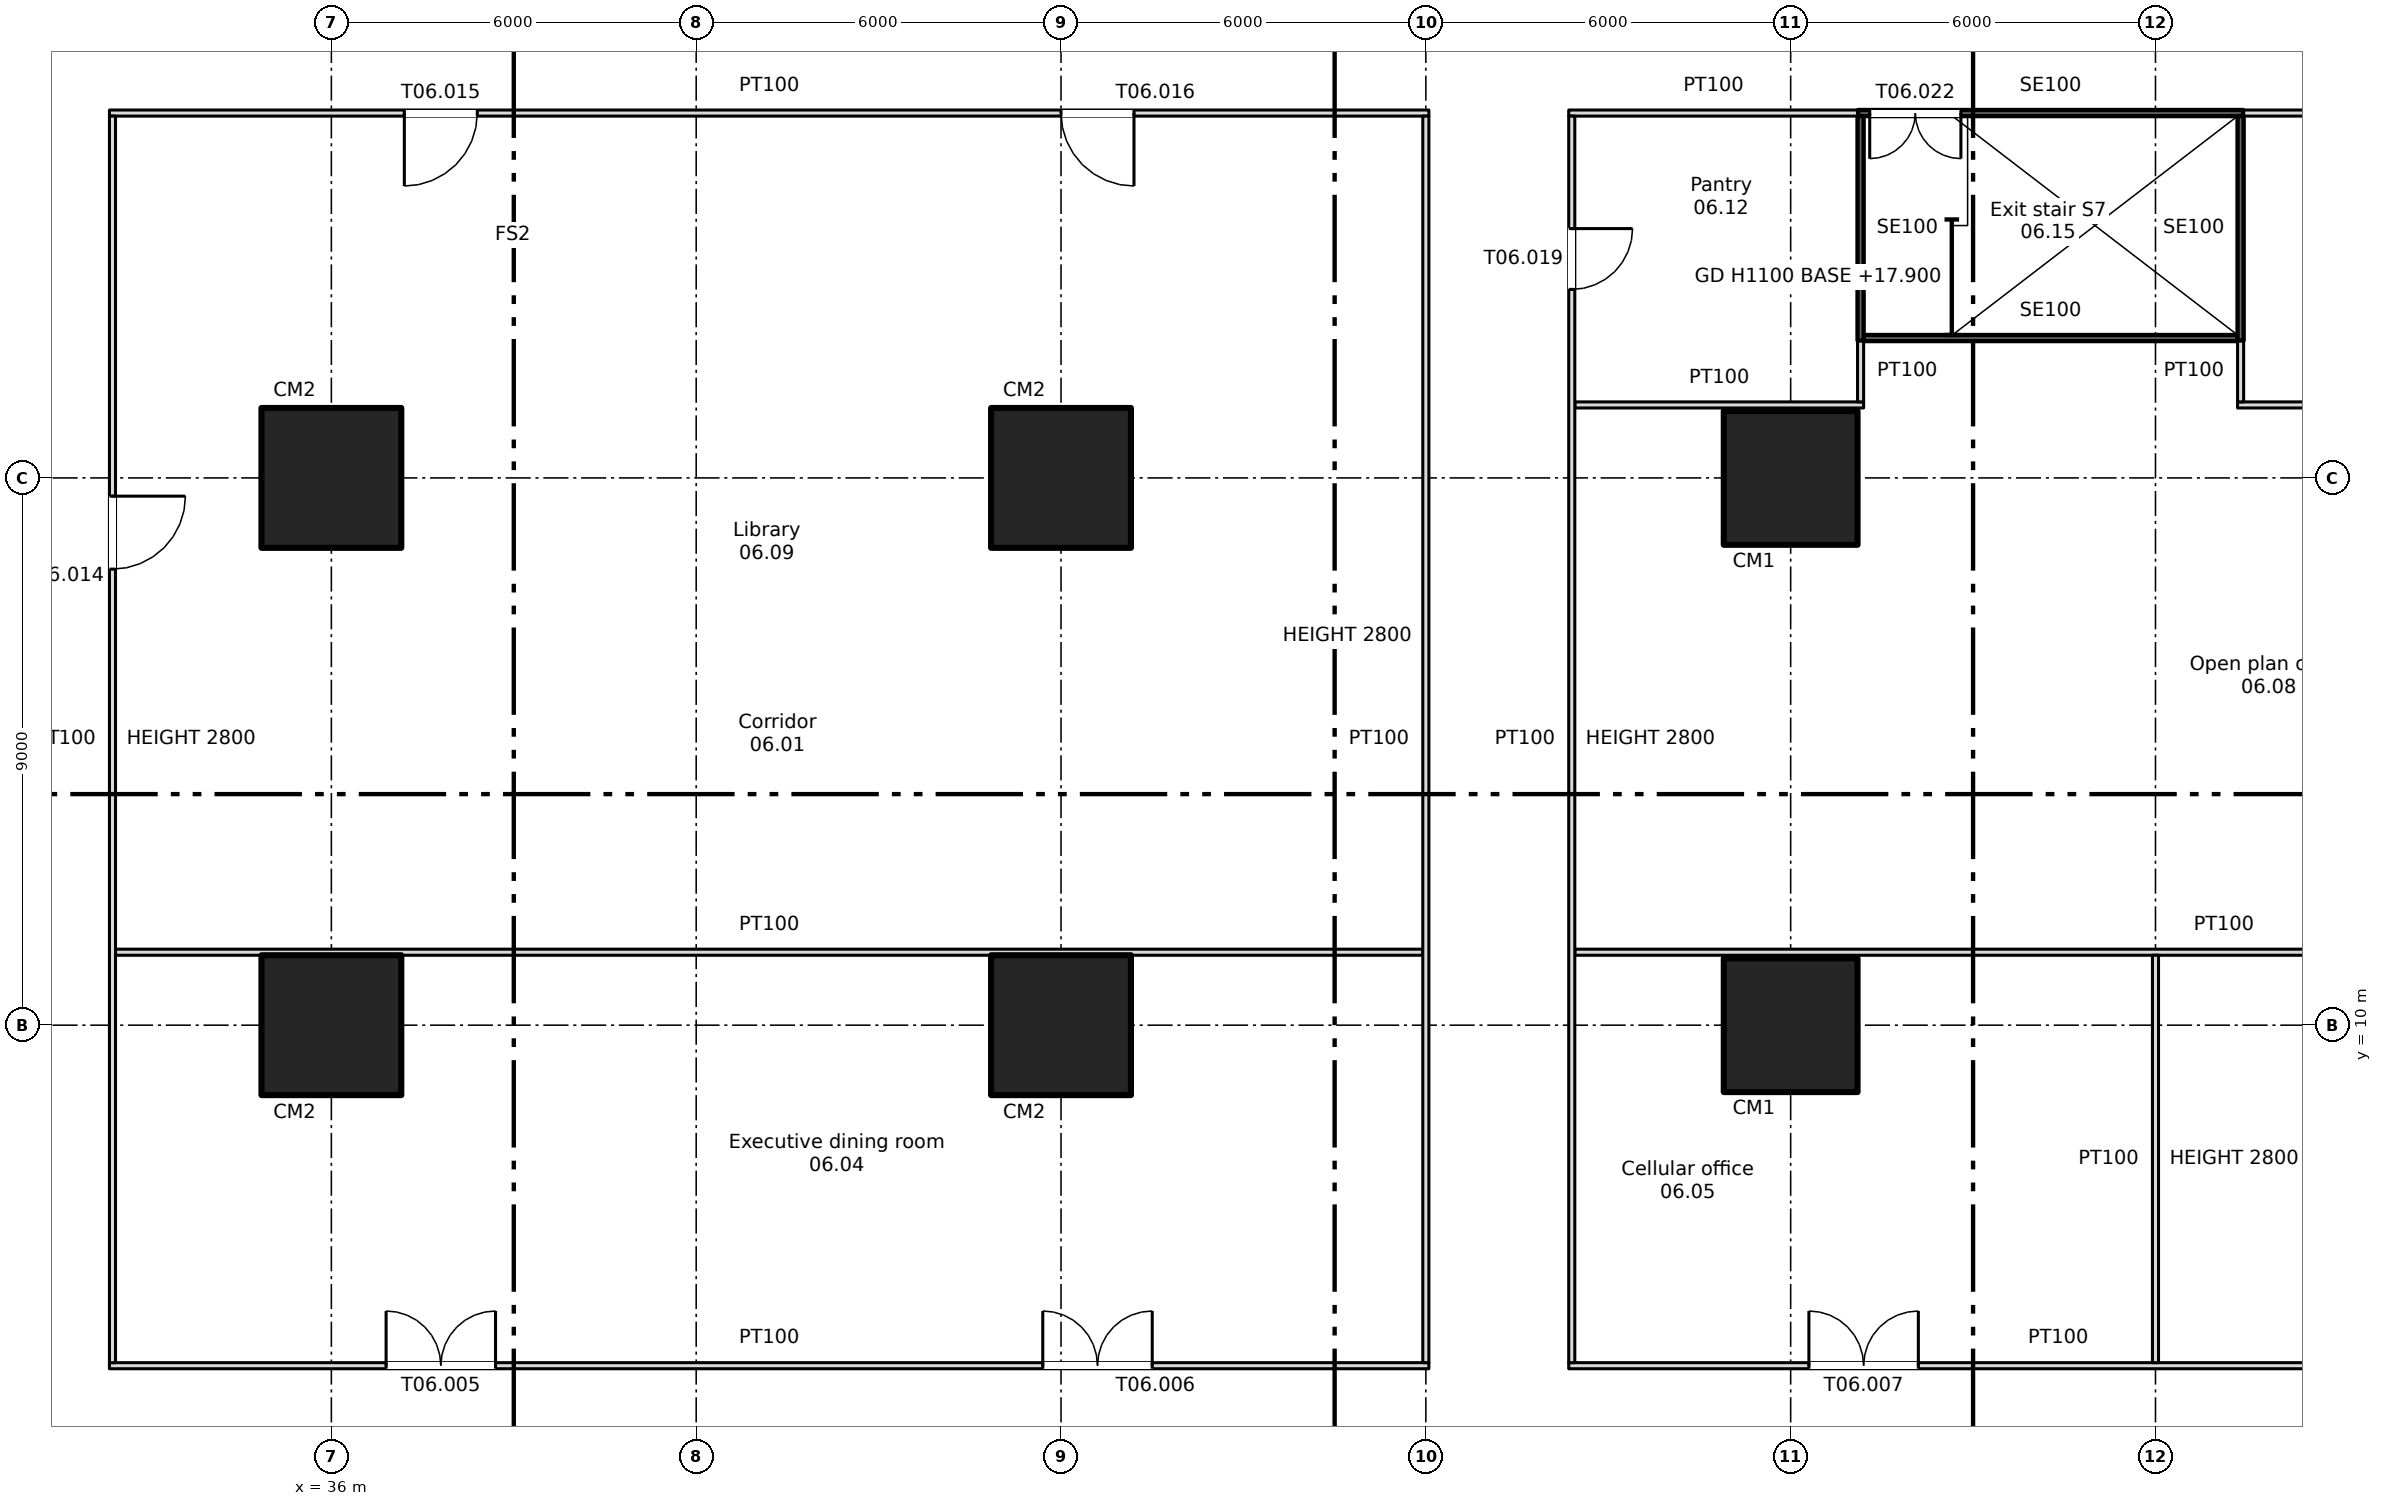
"""IFC4 building model, lengths in metres.
Left out: names, types, materials, properties, quantities, classifications, styles, units other than length and angle.
Written with IfcOpenShell. Run it as: python <this file> out.ifc"""

import sys

from ifc_helpers import new_model, si_unit, direction, frame, frame_2d, origin, origin_2d, place, context, subcontext, project, spatial, rectangle, extrude, element, fill, save


model = new_model("IFC4")
c1 = context("Model", 3, precision=1e-05, world=origin(), true_north=direction((0.0, 1.0)))
c2 = subcontext(c1, "Body", "Model", "MODEL_VIEW")
j1 = project(units=[si_unit("LENGTHUNIT", "METRE"), si_unit("PLANEANGLEUNIT", "RADIAN")], contexts=[c1])
p1 = place(None, origin())
s1 = spatial("IfcSite", under=j1, at=p1, CompositionType="ELEMENT")
p2 = place(p1, origin())
s2 = spatial("IfcBuilding", under=s1, at=p2, CompositionType="ELEMENT")
p3 = place(p2, frame((0.0, 0.0, 17.9)))
s3 = spatial("IfcBuildingStorey", under=s2, at=p3, CompositionType="ELEMENT", Elevation=17.9)
for number, where, z_axis, x_axis in (
    (1, (36.0, 10.0, 0.0), (0.0, 0.0, 1.0), (1.0, 0.0, 0.0)),
    (2, (36.0, 19.0, 0.0), (0.0, 0.0, 1.0), (1.0, 0.0, 0.0)),
    (3, (48.0, 10.0, 0.0), (0.0, 0.0, 1.0), (1.0, 0.0, 0.0)),
    (4, (48.0, 19.0, 0.0), (0.0, 0.0, 1.0), (1.0, 0.0, 0.0)),
):
    element("IfcColumn", number, at=place(p3, frame(where, z_axis=z_axis, x_axis=x_axis)), inside=s3, PredefinedType="COLUMN", context=c2, shape_type="SweptSolid", body=[
        extrude(rectangle(XDim=2.3, YDim=2.3, at=origin_2d()), origin(), (0.0, 0.0, 1.0), 3.8),
    ])
for number, where, z_axis, x_axis in (
    (5, (60.0, 10.0, 0.0), (0.0, 0.0, 1.0), (1.0, 0.0, 0.0)),
    (6, (60.0, 19.0, 0.0), (0.0, 0.0, 1.0), (1.0, 0.0, 0.0)),
):
    element("IfcColumn", number, at=place(p3, frame(where, z_axis=z_axis, x_axis=x_axis)), inside=s3, PredefinedType="COLUMN", context=c2, shape_type="SweptSolid", body=[
        extrude(rectangle(XDim=2.2, YDim=2.2, at=origin_2d()), origin(), (0.0, 0.0, 1.0), 3.8),
    ])
p4 = place(p3, frame((32.35, 4.4, 0.0), z_axis=(0.0, 0.0, 1.0), x_axis=(1.0, 0.0, 0.0)))
e7 = element("IfcWall", 7, at=p4, inside=s3, PredefinedType="PARTITIONING", context=c2, shape_type="SweptSolid", body=[
    extrude(rectangle(XDim=21.7, YDim=0.1, at=frame_2d((10.85, 0.0))), origin(), (0.0, 0.0, 1.0), 3.8),
])
p5 = place(p4, frame((4.55, 0.0, 0.0)))
e8 = element("IfcOpeningElement", 8, at=p5, cuts=e7, PredefinedType="OPENING", context=c2, shape_type="SweptSolid", body=[
    extrude(rectangle(XDim=1.8, YDim=2.1, at=frame_2d((0.9, 1.05))), frame((0.0, 0.06, 0.0), z_axis=(0.0, -1.0, 0.0), x_axis=(1.0, 0.0, 0.0)), (0.0, 0.0, 1.0), 0.12),
])
p6 = place(p4, frame((15.35, 0.0, 0.0)))
e9 = element("IfcOpeningElement", 9, at=p6, cuts=e7, PredefinedType="OPENING", context=c2, shape_type="SweptSolid", body=[
    extrude(rectangle(XDim=1.8, YDim=2.1, at=frame_2d((0.9, 1.05))), frame((0.0, 0.06, 0.0), z_axis=(0.0, -1.0, 0.0), x_axis=(1.0, 0.0, 0.0)), (0.0, 0.0, 1.0), 0.12),
])
p7 = place(p3, frame((56.35, 4.4, 0.0), z_axis=(0.0, 0.0, 1.0), x_axis=(1.0, 0.0, 0.0)))
e10 = element("IfcWall", 10, at=p7, inside=s3, PredefinedType="PARTITIONING", context=c2, shape_type="SweptSolid", body=[
    extrude(rectangle(XDim=16.1, YDim=0.1, at=frame_2d((8.05, 0.0))), origin(), (0.0, 0.0, 1.0), 3.8),
])
p8 = place(p7, frame((3.95, 0.0, 0.0)))
e11 = element("IfcOpeningElement", 11, at=p8, cuts=e10, PredefinedType="OPENING", context=c2, shape_type="SweptSolid", body=[
    extrude(rectangle(XDim=1.8, YDim=2.1, at=frame_2d((0.9, 1.05))), frame((0.0, 0.06, 0.0), z_axis=(0.0, -1.0, 0.0), x_axis=(1.0, 0.0, 0.0)), (0.0, 0.0, 1.0), 0.12),
])
p9 = place(p3, frame((32.45, 11.2, 0.0), z_axis=(0.0, 0.0, 1.0), x_axis=(1.0, 0.0, 0.0)))
e12 = element("IfcWall", 12, at=p9, inside=s3, PredefinedType="PARTITIONING", context=c2, shape_type="SweptSolid", body=[
    extrude(rectangle(XDim=21.5, YDim=0.1, at=frame_2d((10.75, 0.0))), origin(), (0.0, 0.0, 1.0), 3.8),
])
p10 = place(p3, frame((56.45, 11.2, 0.0), z_axis=(0.0, 0.0, 1.0), x_axis=(1.0, 0.0, 0.0)))
e13 = element("IfcWall", 13, at=p10, inside=s3, PredefinedType="PARTITIONING", context=c2, shape_type="SweptSolid", body=[
    extrude(rectangle(XDim=18.3, YDim=0.1, at=frame_2d((9.15, 0.0))), origin(), (0.0, 0.0, 1.0), 3.8),
])
p11 = place(p3, frame((56.45, 20.2, 0.0), z_axis=(0.0, 0.0, 1.0), x_axis=(1.0, 0.0, 0.0)))
e14 = element("IfcWall", 14, at=p11, inside=s3, PredefinedType="PARTITIONING", context=c2, shape_type="SweptSolid", body=[
    extrude(rectangle(XDim=4.75, YDim=0.1, at=frame_2d((2.375, 0.0))), origin(), (0.0, 0.0, 1.0), 3.8),
])
p12 = place(p3, frame((67.35, 20.2, 0.0), z_axis=(0.0, 0.0, 1.0), x_axis=(1.0, 0.0, 0.0)))
e15 = element("IfcWall", 15, at=p12, inside=s3, PredefinedType="PARTITIONING", context=c2, shape_type="SweptSolid", body=[
    extrude(rectangle(XDim=7.4, YDim=0.1, at=frame_2d((3.7, 0.0))), origin(), (0.0, 0.0, 1.0), 3.8),
])
p13 = place(p3, frame((61.2, 21.3, 0.0), z_axis=(0.0, 0.0, 1.0), x_axis=(1.0, 0.0, 0.0)))
e16 = element("IfcWall", 16, at=p13, inside=s3, PredefinedType="SOLIDWALL", context=c2, shape_type="SweptSolid", body=[
    extrude(rectangle(XDim=6.15, YDim=0.1, at=frame_2d((3.075, 0.0))), origin(), (0.0, 0.0, 1.0), 3.8),
])
p14 = place(p3, frame((32.35, 25.0, 0.0), z_axis=(0.0, 0.0, 1.0), x_axis=(1.0, 0.0, 0.0)))
e17 = element("IfcWall", 17, at=p14, inside=s3, PredefinedType="PARTITIONING", context=c2, shape_type="SweptSolid", body=[
    extrude(rectangle(XDim=21.7, YDim=0.1, at=frame_2d((10.85, 0.0))), origin(), (0.0, 0.0, 1.0), 3.8),
])
p15 = place(p14, frame((4.85, 0.0, 0.0)))
e18 = element("IfcOpeningElement", 18, at=p15, cuts=e17, PredefinedType="OPENING", context=c2, shape_type="SweptSolid", body=[
    extrude(rectangle(XDim=1.2, YDim=2.1, at=frame_2d((0.6, 1.05))), frame((0.0, 0.06, 0.0), z_axis=(0.0, -1.0, 0.0), x_axis=(1.0, 0.0, 0.0)), (0.0, 0.0, 1.0), 0.12),
])
p16 = place(p14, frame((15.65, 0.0, 0.0)))
e19 = element("IfcOpeningElement", 19, at=p16, cuts=e17, PredefinedType="OPENING", context=c2, shape_type="SweptSolid", body=[
    extrude(rectangle(XDim=1.2, YDim=2.1, at=frame_2d((0.6, 1.05))), frame((0.0, 0.06, 0.0), z_axis=(0.0, -1.0, 0.0), x_axis=(1.0, 0.0, 0.0)), (0.0, 0.0, 1.0), 0.12),
])
p17 = place(p3, frame((56.35, 25.0, 0.0), z_axis=(0.0, 0.0, 1.0), x_axis=(1.0, 0.0, 0.0)))
e20 = element("IfcWall", 20, at=p17, inside=s3, PredefinedType="PARTITIONING", context=c2, shape_type="SweptSolid", body=[
    extrude(rectangle(XDim=4.76, YDim=0.1, at=frame_2d((2.38, 0.0))), origin(), (0.0, 0.0, 1.0), 3.8),
])
p18 = place(p3, frame((61.11, 25.0, 0.0), z_axis=(0.0, 0.0, 1.0), x_axis=(1.0, 0.0, 0.0)))
e21 = element("IfcWall", 21, at=p18, inside=s3, PredefinedType="SOLIDWALL", context=c2, shape_type="SweptSolid", body=[
    extrude(rectangle(XDim=6.33, YDim=0.1, at=frame_2d((3.165, 0.0))), origin(), (0.0, 0.0, 1.0), 3.8),
])
p19 = place(p18, frame((0.19, 0.0, 0.0)))
e22 = element("IfcOpeningElement", 22, at=p19, cuts=e21, PredefinedType="OPENING", context=c2, shape_type="SweptSolid", body=[
    extrude(rectangle(XDim=1.5, YDim=2.1, at=frame_2d((0.75, 1.05))), frame((0.0, 0.06, 0.0), z_axis=(0.0, -1.0, 0.0), x_axis=(1.0, 0.0, 0.0)), (0.0, 0.0, 1.0), 0.12),
])
p20 = place(p3, frame((67.44, 25.0, 0.0), z_axis=(0.0, 0.0, 1.0), x_axis=(1.0, 0.0, 0.0)))
e23 = element("IfcWall", 23, at=p20, inside=s3, PredefinedType="PARTITIONING", context=c2, shape_type="SweptSolid", body=[
    extrude(rectangle(XDim=7.41, YDim=0.1, at=frame_2d((3.705, 0.0))), origin(), (0.0, 0.0, 1.0), 3.8),
])
p21 = place(p20, frame((3.16, 0.0, 0.0)))
e24 = element("IfcOpeningElement", 24, at=p21, cuts=e23, PredefinedType="OPENING", context=c2, shape_type="SweptSolid", body=[
    extrude(rectangle(XDim=1.0, YDim=2.1, at=frame_2d((0.5, 1.05))), frame((0.0, 0.06, 0.0), z_axis=(0.0, -1.0, 0.0), x_axis=(1.0, 0.0, 0.0)), (0.0, 0.0, 1.0), 0.12),
])
p22 = place(p3, frame((32.4, 4.45, 0.0), z_axis=(0.0, 0.0, 1.0), x_axis=(0.0, 1.0, 0.0)))
e25 = element("IfcWall", 25, at=p22, inside=s3, PredefinedType="PARTITIONING", context=c2, shape_type="SweptSolid", body=[
    extrude(rectangle(XDim=20.5, YDim=0.1, at=frame_2d((10.25, 0.0))), origin(), (0.0, 0.0, 1.0), 2.8),
])
p23 = place(p22, frame((13.05, 0.0, 0.0)))
e26 = element("IfcOpeningElement", 26, at=p23, cuts=e25, PredefinedType="OPENING", context=c2, shape_type="SweptSolid", body=[
    extrude(rectangle(XDim=1.2, YDim=2.1, at=frame_2d((0.6, 1.05))), frame((0.0, 0.06, 0.0), z_axis=(0.0, -1.0, 0.0), x_axis=(1.0, 0.0, 0.0)), (0.0, 0.0, 1.0), 0.12),
])
p24 = place(p3, frame((54.0, 4.45, 0.0), z_axis=(0.0, 0.0, 1.0), x_axis=(0.0, 1.0, 0.0)))
e27 = element("IfcWall", 27, at=p24, inside=s3, PredefinedType="PARTITIONING", context=c2, shape_type="SweptSolid", body=[
    extrude(rectangle(XDim=20.5, YDim=0.1, at=frame_2d((10.25, 0.0))), origin(), (0.0, 0.0, 1.0), 2.8),
])
p25 = place(p3, frame((56.4, 4.45, 0.0), z_axis=(0.0, 0.0, 1.0), x_axis=(0.0, 1.0, 0.0)))
e28 = element("IfcWall", 28, at=p25, inside=s3, PredefinedType="PARTITIONING", context=c2, shape_type="SweptSolid", body=[
    extrude(rectangle(XDim=20.5, YDim=0.1, at=frame_2d((10.25, 0.0))), origin(), (0.0, 0.0, 1.0), 2.8),
])
p26 = place(p25, frame((17.65, 0.0, 0.0)))
e29 = element("IfcOpeningElement", 29, at=p26, cuts=e28, PredefinedType="OPENING", context=c2, shape_type="SweptSolid", body=[
    extrude(rectangle(XDim=1.0, YDim=2.1, at=frame_2d((0.5, 1.05))), frame((0.0, 0.06, 0.0), z_axis=(0.0, -1.0, 0.0), x_axis=(1.0, 0.0, 0.0)), (0.0, 0.0, 1.0), 0.12),
])
p27 = place(p3, frame((61.15, 20.25, 0.0), z_axis=(0.0, 0.0, 1.0), x_axis=(0.0, 1.0, 0.0)))
e30 = element("IfcWall", 30, at=p27, inside=s3, PredefinedType="PARTITIONING", context=c2, shape_type="SweptSolid", body=[
    extrude(rectangle(XDim=1.01, YDim=0.1, at=frame_2d((0.505, 0.0))), origin(), (0.0, 0.0, 1.0), 3.8),
])
p28 = place(p3, frame((61.15, 21.26, 0.0), z_axis=(0.0, 0.0, 1.0), x_axis=(0.0, 1.0, 0.0)))
e31 = element("IfcWall", 31, at=p28, inside=s3, PredefinedType="SOLIDWALL", context=c2, shape_type="SweptSolid", body=[
    extrude(rectangle(XDim=3.69, YDim=0.1, at=frame_2d((1.845, 0.0))), origin(), (0.0, 0.0, 1.0), 3.8),
])
p29 = place(p3, frame((66.0, 4.45, 0.0), z_axis=(0.0, 0.0, 1.0), x_axis=(0.0, 1.0, 0.0)))
e32 = element("IfcWall", 32, at=p29, inside=s3, PredefinedType="PARTITIONING", context=c2, shape_type="SweptSolid", body=[
    extrude(rectangle(XDim=6.7, YDim=0.1, at=frame_2d((3.35, 0.0))), origin(), (0.0, 0.0, 1.0), 2.8),
])
p30 = place(p3, frame((67.4, 20.25, 0.0), z_axis=(0.0, 0.0, 1.0), x_axis=(0.0, 1.0, 0.0)))
e33 = element("IfcWall", 33, at=p30, inside=s3, PredefinedType="PARTITIONING", context=c2, shape_type="SweptSolid", body=[
    extrude(rectangle(XDim=1.01, YDim=0.1, at=frame_2d((0.505, 0.0))), origin(), (0.0, 0.0, 1.0), 3.8),
])
p31 = place(p3, frame((67.4, 21.26, 0.0), z_axis=(0.0, 0.0, 1.0), x_axis=(0.0, 1.0, 0.0)))
e34 = element("IfcWall", 34, at=p31, inside=s3, PredefinedType="SOLIDWALL", context=c2, shape_type="SweptSolid", body=[
    extrude(rectangle(XDim=3.69, YDim=0.1, at=frame_2d((1.845, 0.0))), origin(), (0.0, 0.0, 1.0), 3.8),
])
p32 = place(p5, origin())
e35 = element("IfcDoor", 35, at=p32, inside=s3, OperationType="DOUBLE_DOOR_SINGLE_SWING", PredefinedType="DOOR", context=c2, shape_type="SweptSolid", body=[
    extrude(rectangle(XDim=1.8, YDim=2.1, at=frame_2d((0.9, 1.05))), frame((0.0, 0.025, 0.0), z_axis=(0.0, -1.0, 0.0), x_axis=(1.0, 0.0, 0.0)), (0.0, 0.0, 1.0), 0.05),
])
fill(e8, e35)
p33 = place(p6, origin())
e36 = element("IfcDoor", 36, at=p33, inside=s3, OperationType="DOUBLE_DOOR_SINGLE_SWING", PredefinedType="DOOR", context=c2, shape_type="SweptSolid", body=[
    extrude(rectangle(XDim=1.8, YDim=2.1, at=frame_2d((0.9, 1.05))), frame((0.0, 0.025, 0.0), z_axis=(0.0, -1.0, 0.0), x_axis=(1.0, 0.0, 0.0)), (0.0, 0.0, 1.0), 0.05),
])
fill(e9, e36)
p34 = place(p8, origin())
e37 = element("IfcDoor", 37, at=p34, inside=s3, OperationType="DOUBLE_DOOR_SINGLE_SWING", PredefinedType="DOOR", context=c2, shape_type="SweptSolid", body=[
    extrude(rectangle(XDim=1.8, YDim=2.1, at=frame_2d((0.9, 1.05))), frame((0.0, 0.025, 0.0), z_axis=(0.0, -1.0, 0.0), x_axis=(1.0, 0.0, 0.0)), (0.0, 0.0, 1.0), 0.05),
])
fill(e11, e37)
p35 = place(p23, origin())
e38 = element("IfcDoor", 38, at=p35, inside=s3, OperationType="SINGLE_SWING_RIGHT", PredefinedType="DOOR", context=c2, shape_type="SweptSolid", body=[
    extrude(rectangle(XDim=1.2, YDim=2.1, at=frame_2d((0.6, 1.05))), frame((0.0, 0.025, 0.0), z_axis=(0.0, -1.0, 0.0), x_axis=(1.0, 0.0, 0.0)), (0.0, 0.0, 1.0), 0.05),
])
fill(e26, e38)
p36 = place(p15, origin())
e39 = element("IfcDoor", 39, at=p36, inside=s3, OperationType="SINGLE_SWING_LEFT", PredefinedType="DOOR", context=c2, shape_type="SweptSolid", body=[
    extrude(rectangle(XDim=1.2, YDim=2.1, at=frame_2d((0.6, 1.05))), frame((0.0, 0.025, 0.0), z_axis=(0.0, -1.0, 0.0), x_axis=(1.0, 0.0, 0.0)), (0.0, 0.0, 1.0), 0.05),
])
fill(e18, e39)
p37 = place(p16, origin())
e40 = element("IfcDoor", 40, at=p37, inside=s3, OperationType="SINGLE_SWING_RIGHT", PredefinedType="DOOR", context=c2, shape_type="SweptSolid", body=[
    extrude(rectangle(XDim=1.2, YDim=2.1, at=frame_2d((0.6, 1.05))), frame((0.0, 0.025, 0.0), z_axis=(0.0, -1.0, 0.0), x_axis=(1.0, 0.0, 0.0)), (0.0, 0.0, 1.0), 0.05),
])
fill(e19, e40)
p38 = place(p26, origin())
e41 = element("IfcDoor", 41, at=p38, inside=s3, OperationType="SINGLE_SWING_RIGHT", PredefinedType="DOOR", context=c2, shape_type="SweptSolid", body=[
    extrude(rectangle(XDim=1.0, YDim=2.1, at=frame_2d((0.5, 1.05))), frame((0.0, 0.025, 0.0), z_axis=(0.0, -1.0, 0.0), x_axis=(1.0, 0.0, 0.0)), (0.0, 0.0, 1.0), 0.05),
])
fill(e29, e41)
p39 = place(p19, origin())
e42 = element("IfcDoor", 42, at=p39, inside=s3, OperationType="DOUBLE_DOOR_SINGLE_SWING", PredefinedType="DOOR", context=c2, shape_type="SweptSolid", body=[
    extrude(rectangle(XDim=1.5, YDim=2.1, at=frame_2d((0.75, 1.05))), frame((0.0, 0.025, 0.0), z_axis=(0.0, -1.0, 0.0), x_axis=(1.0, 0.0, 0.0)), (0.0, 0.0, 1.0), 0.05),
])
fill(e22, e42)
save(model, sys.argv[1])
